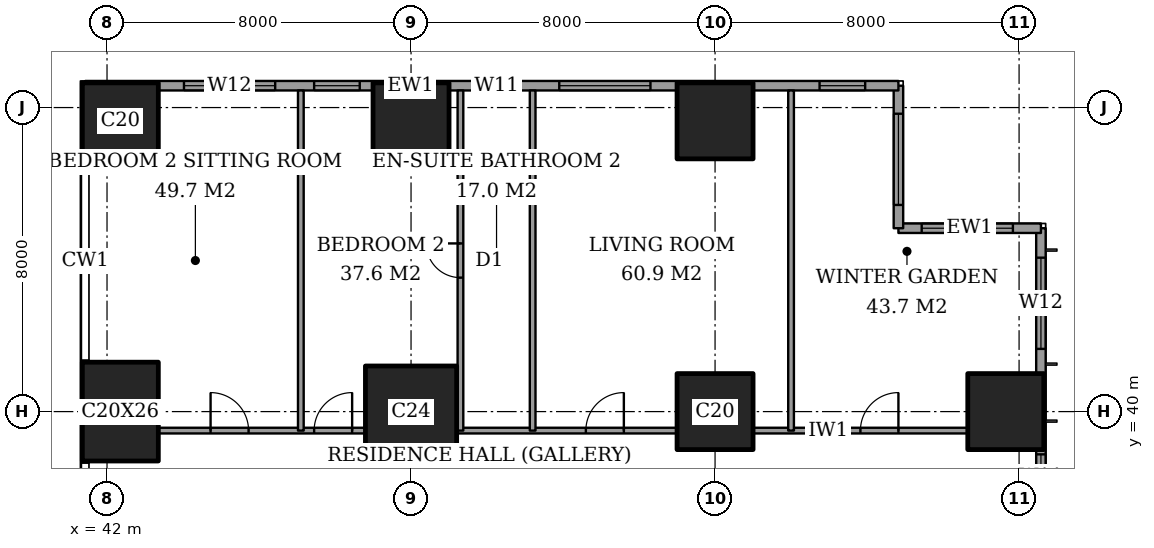
"""IFC4 building model, lengths in metres.
Left out: names, types, materials, properties, quantities, classifications, styles, units other than length and angle.
Written with IfcOpenShell. Run it as: python <this file> out.ifc"""

import sys

from ifc_helpers import new_model, si_unit, direction, frame, frame_2d, origin, origin_2d, place, context, subcontext, project, spatial, rectangle, extrude, element, fill, save


model = new_model("IFC4")
c1 = context("Model", 3, precision=1e-05, world=origin(), true_north=direction((0.0, 1.0)))
c2 = subcontext(c1, "Body", "Model", "MODEL_VIEW")
j1 = project(units=[si_unit("LENGTHUNIT", "METRE"), si_unit("PLANEANGLEUNIT", "RADIAN")], contexts=[c1])
p1 = place(None, origin())
s1 = spatial("IfcSite", under=j1, at=p1, CompositionType="ELEMENT")
p2 = place(p1, origin())
s2 = spatial("IfcBuilding", under=s1, at=p2, CompositionType="ELEMENT")
p3 = place(p2, frame((0.0, 0.0, 117.8)))
s3 = spatial("IfcBuildingStorey", under=s2, at=p3, CompositionType="ELEMENT", Elevation=117.8)
p4 = place(p3, frame((42.35, 40.0, 0.0), z_axis=(0.0, 0.0, 1.0), x_axis=(1.0, 0.0, 0.0)))
e1 = element("IfcColumn", 1, at=p4, inside=s3, PredefinedType="COLUMN", context=c2, shape_type="SweptSolid", body=[
    extrude(rectangle(XDim=2.0, YDim=2.6, at=origin_2d()), origin(), (0.0, 0.0, 1.0), 3.6),
])
p5 = place(p3, frame((42.35, 47.65, 0.0), z_axis=(0.0, 0.0, 1.0), x_axis=(1.0, 0.0, 0.0)))
e2 = element("IfcColumn", 2, at=p5, inside=s3, PredefinedType="COLUMN", context=c2, shape_type="SweptSolid", body=[
    extrude(rectangle(XDim=2.0, YDim=2.0, at=origin_2d()), origin(), (0.0, 0.0, 1.0), 3.6),
])
p6 = place(p3, frame((50.0, 40.0, 0.0), z_axis=(0.0, 0.0, 1.0), x_axis=(1.0, 0.0, 0.0)))
e3 = element("IfcColumn", 3, at=p6, inside=s3, PredefinedType="COLUMN", context=c2, shape_type="SweptSolid", body=[
    extrude(rectangle(XDim=2.4, YDim=2.4, at=origin_2d()), origin(), (0.0, 0.0, 1.0), 3.6),
])
for number, where, z_axis, x_axis in (
    (4, (50.0, 47.65, 0.0), (0.0, 0.0, 1.0), (1.0, 0.0, 0.0)),
    (5, (58.0, 40.0, 0.0), (0.0, 0.0, 1.0), (1.0, 0.0, 0.0)),
    (6, (58.0, 47.65, 0.0), (0.0, 0.0, 1.0), (1.0, 0.0, 0.0)),
    (7, (65.65, 40.0, 0.0), (0.0, 0.0, 1.0), (1.0, 0.0, 0.0)),
):
    element("IfcColumn", number, at=place(p3, frame(where, z_axis=z_axis, x_axis=x_axis)), inside=s3, PredefinedType="COLUMN", context=c2, shape_type="SweptSolid", body=[
        extrude(rectangle(XDim=2.0, YDim=2.0, at=origin_2d()), origin(), (0.0, 0.0, 1.0), 3.6),
    ])
p7 = place(p3, frame((66.575, 3.175, 0.0), z_axis=(0.0, 0.0, 1.0), x_axis=(0.0, 1.0, 0.0)))
e8 = element("IfcWall", 8, at=p7, inside=s3, PredefinedType="SOLIDWALL", context=c2, shape_type="SweptSolid", body=[
    extrude(rectangle(XDim=41.65, YDim=0.25, at=frame_2d((20.825, 0.0))), origin(), (0.0, 0.0, 1.0), 3.6),
])
p8 = place(p7, frame((0.775, 0.0, 0.4)))
e9 = element("IfcOpeningElement", 9, at=p8, cuts=e8, PredefinedType="OPENING", context=c2, shape_type="SweptSolid", body=[
    extrude(rectangle(XDim=2.4, YDim=2.2, at=frame_2d((1.2, 1.1))), frame((0.0, 0.135, 0.0), z_axis=(0.0, -1.0, 0.0), x_axis=(1.0, 0.0, 0.0)), (0.0, 0.0, 1.0), 0.27),
])
p9 = place(p7, frame((6.4, 0.0, 0.4)))
e10 = element("IfcOpeningElement", 10, at=p9, cuts=e8, PredefinedType="OPENING", context=c2, shape_type="SweptSolid", body=[
    extrude(rectangle(XDim=1.2, YDim=2.2, at=frame_2d((0.6, 1.1))), frame((0.0, 0.135, 0.0), z_axis=(0.0, -1.0, 0.0), x_axis=(1.0, 0.0, 0.0)), (0.0, 0.0, 1.0), 0.27),
])
p10 = place(p7, frame((8.475, 0.0, 0.4)))
e11 = element("IfcOpeningElement", 11, at=p10, cuts=e8, PredefinedType="OPENING", context=c2, shape_type="SweptSolid", body=[
    extrude(rectangle(XDim=2.4, YDim=2.2, at=frame_2d((1.2, 1.1))), frame((0.0, 0.135, 0.0), z_axis=(0.0, -1.0, 0.0), x_axis=(1.0, 0.0, 0.0)), (0.0, 0.0, 1.0), 0.27),
])
p11 = place(p7, frame((15.775, 0.0, 0.4)))
e12 = element("IfcOpeningElement", 12, at=p11, cuts=e8, PredefinedType="OPENING", context=c2, shape_type="SweptSolid", body=[
    extrude(rectangle(XDim=2.4, YDim=2.2, at=frame_2d((1.2, 1.1))), frame((0.0, 0.135, 0.0), z_axis=(0.0, -1.0, 0.0), x_axis=(1.0, 0.0, 0.0)), (0.0, 0.0, 1.0), 0.27),
])
p12 = place(p7, frame((23.475, 0.0, 0.4)))
e13 = element("IfcOpeningElement", 13, at=p12, cuts=e8, PredefinedType="OPENING", context=c2, shape_type="SweptSolid", body=[
    extrude(rectangle(XDim=2.4, YDim=2.2, at=frame_2d((1.2, 1.1))), frame((0.0, 0.135, 0.0), z_axis=(0.0, -1.0, 0.0), x_axis=(1.0, 0.0, 0.0)), (0.0, 0.0, 1.0), 0.27),
])
p13 = place(p7, frame((30.975, 0.0, 0.4)))
e14 = element("IfcOpeningElement", 14, at=p13, cuts=e8, PredefinedType="OPENING", context=c2, shape_type="SweptSolid", body=[
    extrude(rectangle(XDim=2.4, YDim=2.2, at=frame_2d((1.2, 1.1))), frame((0.0, 0.135, 0.0), z_axis=(0.0, -1.0, 0.0), x_axis=(1.0, 0.0, 0.0)), (0.0, 0.0, 1.0), 0.27),
])
p14 = place(p7, frame((34.5, 0.0, 0.4)))
e15 = element("IfcOpeningElement", 15, at=p14, cuts=e8, PredefinedType="OPENING", context=c2, shape_type="SweptSolid", body=[
    extrude(rectangle(XDim=1.2, YDim=2.2, at=frame_2d((0.6, 1.1))), frame((0.0, 0.135, 0.0), z_axis=(0.0, -1.0, 0.0), x_axis=(1.0, 0.0, 0.0)), (0.0, 0.0, 1.0), 0.27),
])
p15 = place(p7, frame((38.475, 0.0, 0.4)))
e16 = element("IfcOpeningElement", 16, at=p15, cuts=e8, PredefinedType="OPENING", context=c2, shape_type="SweptSolid", body=[
    extrude(rectangle(XDim=2.4, YDim=2.2, at=frame_2d((1.2, 1.1))), frame((0.0, 0.135, 0.0), z_axis=(0.0, -1.0, 0.0), x_axis=(1.0, 0.0, 0.0)), (0.0, 0.0, 1.0), 0.27),
])
p16 = place(p3, frame((66.575, 44.825, 0.0), z_axis=(0.0, 0.0, 1.0), x_axis=(-1.0, 0.0, 0.0)))
e17 = element("IfcWall", 17, at=p16, inside=s3, PredefinedType="SOLIDWALL", context=c2, shape_type="SweptSolid", body=[
    extrude(rectangle(XDim=3.75, YDim=0.25, at=frame_2d((1.875, 0.0))), origin(), (0.0, 0.0, 1.0), 3.6),
])
p17 = place(p16, frame((0.738, 0.0, 0.4)))
e18 = element("IfcOpeningElement", 18, at=p17, cuts=e17, PredefinedType="OPENING", context=c2, shape_type="SweptSolid", body=[
    extrude(rectangle(XDim=2.4, YDim=2.2, at=frame_2d((1.2, 1.1))), frame((0.0, 0.135, 0.0), z_axis=(0.0, -1.0, 0.0), x_axis=(1.0, 0.0, 0.0)), (0.0, 0.0, 1.0), 0.27),
])
p18 = place(p3, frame((62.825, 44.825, 0.0), z_axis=(0.0, 0.0, 1.0), x_axis=(0.0, 1.0, 0.0)))
e19 = element("IfcWall", 19, at=p18, inside=s3, PredefinedType="SOLIDWALL", context=c2, shape_type="SweptSolid", body=[
    extrude(rectangle(XDim=3.75, YDim=0.25, at=frame_2d((1.875, 0.0))), origin(), (0.0, 0.0, 1.0), 3.6),
])
p19 = place(p18, frame((0.613, 0.0, 0.4)))
e20 = element("IfcOpeningElement", 20, at=p19, cuts=e19, PredefinedType="OPENING", context=c2, shape_type="SweptSolid", body=[
    extrude(rectangle(XDim=2.4, YDim=2.2, at=frame_2d((1.2, 1.1))), frame((0.0, 0.135, 0.0), z_axis=(0.0, -1.0, 0.0), x_axis=(1.0, 0.0, 0.0)), (0.0, 0.0, 1.0), 0.27),
])
p20 = place(p3, frame((62.825, 48.575, 0.0), z_axis=(0.0, 0.0, 1.0), x_axis=(-1.0, 0.0, 0.0)))
e21 = element("IfcWall", 21, at=p20, inside=s3, PredefinedType="SOLIDWALL", context=c2, shape_type="SweptSolid", body=[
    extrude(rectangle(XDim=21.4, YDim=0.25, at=frame_2d((10.7, 0.0))), origin(), (0.0, 0.0, 1.0), 3.6),
])
p21 = place(p20, frame((0.875, 0.0, 0.4)))
e22 = element("IfcOpeningElement", 22, at=p21, cuts=e21, PredefinedType="OPENING", context=c2, shape_type="SweptSolid", body=[
    extrude(rectangle(XDim=1.2, YDim=2.2, at=frame_2d((0.6, 1.1))), frame((0.0, 0.135, 0.0), z_axis=(0.0, -1.0, 0.0), x_axis=(1.0, 0.0, 0.0)), (0.0, 0.0, 1.0), 0.27),
])
p22 = place(p20, frame((6.525, 0.0, 0.4)))
e23 = element("IfcOpeningElement", 23, at=p22, cuts=e21, PredefinedType="OPENING", context=c2, shape_type="SweptSolid", body=[
    extrude(rectangle(XDim=2.4, YDim=2.2, at=frame_2d((1.2, 1.1))), frame((0.0, 0.135, 0.0), z_axis=(0.0, -1.0, 0.0), x_axis=(1.0, 0.0, 0.0)), (0.0, 0.0, 1.0), 0.27),
])
p23 = place(p20, frame((9.975, 0.0, 0.4)))
e24 = element("IfcOpeningElement", 24, at=p23, cuts=e21, PredefinedType="OPENING", context=c2, shape_type="SweptSolid", body=[
    extrude(rectangle(XDim=1.2, YDim=2.2, at=frame_2d((0.6, 1.1))), frame((0.0, 0.135, 0.0), z_axis=(0.0, -1.0, 0.0), x_axis=(1.0, 0.0, 0.0)), (0.0, 0.0, 1.0), 0.27),
])
p24 = place(p20, frame((14.175, 0.0, 0.4)))
e25 = element("IfcOpeningElement", 25, at=p24, cuts=e21, PredefinedType="OPENING", context=c2, shape_type="SweptSolid", body=[
    extrude(rectangle(XDim=1.2, YDim=2.2, at=frame_2d((0.6, 1.1))), frame((0.0, 0.135, 0.0), z_axis=(0.0, -1.0, 0.0), x_axis=(1.0, 0.0, 0.0)), (0.0, 0.0, 1.0), 0.27),
])
p25 = place(p20, frame((16.4, 0.0, 0.4)))
e26 = element("IfcOpeningElement", 26, at=p25, cuts=e21, PredefinedType="OPENING", context=c2, shape_type="SweptSolid", body=[
    extrude(rectangle(XDim=2.4, YDim=2.2, at=frame_2d((1.2, 1.1))), frame((0.0, 0.135, 0.0), z_axis=(0.0, -1.0, 0.0), x_axis=(1.0, 0.0, 0.0)), (0.0, 0.0, 1.0), 0.27),
])
p26 = place(p3, frame((43.35, 39.5, 0.0), z_axis=(0.0, 0.0, 1.0), x_axis=(1.0, 0.0, 0.0)))
e27 = element("IfcWall", 27, at=p26, inside=s3, PredefinedType="PARTITIONING", context=c2, shape_type="SweptSolid", body=[
    extrude(rectangle(XDim=5.45, YDim=0.15, at=frame_2d((2.725, 0.0))), origin(), (0.0, 0.0, 1.0), 3.35),
])
p27 = place(p26, frame((4.1, 0.0, 0.0)))
e28 = element("IfcOpeningElement", 28, at=p27, cuts=e27, PredefinedType="OPENING", context=c2, shape_type="SweptSolid", body=[
    extrude(rectangle(XDim=1.0, YDim=2.1, at=frame_2d((0.5, 1.05))), frame((0.0, 0.085, 0.0), z_axis=(0.0, -1.0, 0.0), x_axis=(1.0, 0.0, 0.0)), (0.0, 0.0, 1.0), 0.17),
])
p28 = place(p26, frame((1.375, 0.0, 0.0)))
e29 = element("IfcOpeningElement", 29, at=p28, cuts=e27, PredefinedType="OPENING", context=c2, shape_type="SweptSolid", body=[
    extrude(rectangle(XDim=1.0, YDim=2.1, at=frame_2d((0.5, 1.05))), frame((0.0, 0.085, 0.0), z_axis=(0.0, -1.0, 0.0), x_axis=(1.0, 0.0, 0.0)), (0.0, 0.0, 1.0), 0.17),
])
p29 = place(p3, frame((51.2, 39.5, 0.0), z_axis=(0.0, 0.0, 1.0), x_axis=(1.0, 0.0, 0.0)))
e30 = element("IfcWall", 30, at=p29, inside=s3, PredefinedType="PARTITIONING", context=c2, shape_type="SweptSolid", body=[
    extrude(rectangle(XDim=5.8, YDim=0.15, at=frame_2d((2.9, 0.0))), origin(), (0.0, 0.0, 1.0), 3.35),
])
p30 = place(p29, frame((3.4, 0.0, 0.0)))
e31 = element("IfcOpeningElement", 31, at=p30, cuts=e30, PredefinedType="OPENING", context=c2, shape_type="SweptSolid", body=[
    extrude(rectangle(XDim=1.0, YDim=2.1, at=frame_2d((0.5, 1.05))), frame((0.0, 0.085, 0.0), z_axis=(0.0, -1.0, 0.0), x_axis=(1.0, 0.0, 0.0)), (0.0, 0.0, 1.0), 0.17),
])
p31 = place(p3, frame((59.0, 39.5, 0.0), z_axis=(0.0, 0.0, 1.0), x_axis=(1.0, 0.0, 0.0)))
e32 = element("IfcWall", 32, at=p31, inside=s3, PredefinedType="PARTITIONING", context=c2, shape_type="SweptSolid", body=[
    extrude(rectangle(XDim=5.65, YDim=0.15, at=frame_2d((2.825, 0.0))), origin(), (0.0, 0.0, 1.0), 3.35),
])
p32 = place(p31, frame((2.825, 0.0, 0.0)))
e33 = element("IfcOpeningElement", 33, at=p32, cuts=e32, PredefinedType="OPENING", context=c2, shape_type="SweptSolid", body=[
    extrude(rectangle(XDim=1.0, YDim=2.1, at=frame_2d((0.5, 1.05))), frame((0.0, 0.085, 0.0), z_axis=(0.0, -1.0, 0.0), x_axis=(1.0, 0.0, 0.0)), (0.0, 0.0, 1.0), 0.17),
])
p33 = place(p3, frame((47.1, 39.5, 0.0), z_axis=(0.0, 0.0, 1.0), x_axis=(0.0, 1.0, 0.0)))
e34 = element("IfcWall", 34, at=p33, inside=s3, PredefinedType="PARTITIONING", context=c2, shape_type="SweptSolid", body=[
    extrude(rectangle(XDim=8.95, YDim=0.15, at=frame_2d((4.475, 0.0))), origin(), (0.0, 0.0, 1.0), 3.35),
])
p34 = place(p3, frame((51.3, 39.5, 0.0), z_axis=(0.0, 0.0, 1.0), x_axis=(0.0, 1.0, 0.0)))
e35 = element("IfcWall", 35, at=p34, inside=s3, PredefinedType="PARTITIONING", context=c2, shape_type="SweptSolid", body=[
    extrude(rectangle(XDim=8.95, YDim=0.15, at=frame_2d((4.475, 0.0))), origin(), (0.0, 0.0, 1.0), 3.35),
])
p35 = place(p34, frame((4.025, 0.0, 0.0)))
e36 = element("IfcOpeningElement", 36, at=p35, cuts=e35, PredefinedType="OPENING", context=c2, shape_type="SweptSolid", body=[
    extrude(rectangle(XDim=0.9, YDim=2.1, at=frame_2d((0.45, 1.05))), frame((0.0, 0.085, 0.0), z_axis=(0.0, -1.0, 0.0), x_axis=(1.0, 0.0, 0.0)), (0.0, 0.0, 1.0), 0.17),
])
for number, where, z_axis, x_axis in (
    (37, (53.2, 39.5, 0.0), (0.0, 0.0, 1.0), (0.0, 1.0, 0.0)),
    (38, (60.0, 39.5, 0.0), (0.0, 0.0, 1.0), (0.0, 1.0, 0.0)),
):
    element("IfcWall", number, at=place(p3, frame(where, z_axis=z_axis, x_axis=x_axis)), inside=s3, PredefinedType="PARTITIONING", context=c2, shape_type="SweptSolid", body=[
        extrude(rectangle(XDim=8.95, YDim=0.15, at=frame_2d((4.475, 0.0))), origin(), (0.0, 0.0, 1.0), 3.35),
    ])
p36 = place(p14, origin())
e39 = element("IfcWindow", 39, at=p36, inside=s3, PartitioningType="SINGLE_PANEL", PredefinedType="WINDOW", context=c2, shape_type="SweptSolid", body=[
    extrude(rectangle(XDim=1.2, YDim=2.2, at=frame_2d((0.6, 1.1))), frame((0.0, 0.03, 0.0), z_axis=(0.0, -1.0, 0.0), x_axis=(1.0, 0.0, 0.0)), (0.0, 0.0, 1.0), 0.06),
])
fill(e15, e39)
p37 = place(p15, origin())
e40 = element("IfcWindow", 40, at=p37, inside=s3, PartitioningType="SINGLE_PANEL", PredefinedType="WINDOW", context=c2, shape_type="SweptSolid", body=[
    extrude(rectangle(XDim=2.4, YDim=2.2, at=frame_2d((1.2, 1.1))), frame((0.0, 0.03, 0.0), z_axis=(0.0, -1.0, 0.0), x_axis=(1.0, 0.0, 0.0)), (0.0, 0.0, 1.0), 0.06),
])
fill(e16, e40)
p38 = place(p17, origin())
e41 = element("IfcWindow", 41, at=p38, inside=s3, PartitioningType="SINGLE_PANEL", PredefinedType="WINDOW", context=c2, shape_type="SweptSolid", body=[
    extrude(rectangle(XDim=2.4, YDim=2.2, at=frame_2d((1.2, 1.1))), frame((0.0, 0.03, 0.0), z_axis=(0.0, -1.0, 0.0), x_axis=(1.0, 0.0, 0.0)), (0.0, 0.0, 1.0), 0.06),
])
fill(e18, e41)
p39 = place(p19, origin())
e42 = element("IfcWindow", 42, at=p39, inside=s3, PartitioningType="SINGLE_PANEL", PredefinedType="WINDOW", context=c2, shape_type="SweptSolid", body=[
    extrude(rectangle(XDim=2.4, YDim=2.2, at=frame_2d((1.2, 1.1))), frame((0.0, 0.03, 0.0), z_axis=(0.0, -1.0, 0.0), x_axis=(1.0, 0.0, 0.0)), (0.0, 0.0, 1.0), 0.06),
])
fill(e20, e42)
p40 = place(p21, origin())
e43 = element("IfcWindow", 43, at=p40, inside=s3, PartitioningType="SINGLE_PANEL", PredefinedType="WINDOW", context=c2, shape_type="SweptSolid", body=[
    extrude(rectangle(XDim=1.2, YDim=2.2, at=frame_2d((0.6, 1.1))), frame((0.0, 0.03, 0.0), z_axis=(0.0, -1.0, 0.0), x_axis=(1.0, 0.0, 0.0)), (0.0, 0.0, 1.0), 0.06),
])
fill(e22, e43)
p41 = place(p22, origin())
e44 = element("IfcWindow", 44, at=p41, inside=s3, PartitioningType="SINGLE_PANEL", PredefinedType="WINDOW", context=c2, shape_type="SweptSolid", body=[
    extrude(rectangle(XDim=2.4, YDim=2.2, at=frame_2d((1.2, 1.1))), frame((0.0, 0.03, 0.0), z_axis=(0.0, -1.0, 0.0), x_axis=(1.0, 0.0, 0.0)), (0.0, 0.0, 1.0), 0.06),
])
fill(e23, e44)
p42 = place(p23, origin())
e45 = element("IfcWindow", 45, at=p42, inside=s3, PartitioningType="SINGLE_PANEL", PredefinedType="WINDOW", context=c2, shape_type="SweptSolid", body=[
    extrude(rectangle(XDim=1.2, YDim=2.2, at=frame_2d((0.6, 1.1))), frame((0.0, 0.03, 0.0), z_axis=(0.0, -1.0, 0.0), x_axis=(1.0, 0.0, 0.0)), (0.0, 0.0, 1.0), 0.06),
])
fill(e24, e45)
p43 = place(p24, origin())
e46 = element("IfcWindow", 46, at=p43, inside=s3, PartitioningType="SINGLE_PANEL", PredefinedType="WINDOW", context=c2, shape_type="SweptSolid", body=[
    extrude(rectangle(XDim=1.2, YDim=2.2, at=frame_2d((0.6, 1.1))), frame((0.0, 0.03, 0.0), z_axis=(0.0, -1.0, 0.0), x_axis=(1.0, 0.0, 0.0)), (0.0, 0.0, 1.0), 0.06),
])
fill(e25, e46)
p44 = place(p25, origin())
e47 = element("IfcWindow", 47, at=p44, inside=s3, PartitioningType="SINGLE_PANEL", PredefinedType="WINDOW", context=c2, shape_type="SweptSolid", body=[
    extrude(rectangle(XDim=2.4, YDim=2.2, at=frame_2d((1.2, 1.1))), frame((0.0, 0.03, 0.0), z_axis=(0.0, -1.0, 0.0), x_axis=(1.0, 0.0, 0.0)), (0.0, 0.0, 1.0), 0.06),
])
fill(e26, e47)
p45 = place(p32, origin())
e48 = element("IfcDoor", 48, at=p45, inside=s3, OperationType="SINGLE_SWING_LEFT", PredefinedType="DOOR", context=c2, shape_type="SweptSolid", body=[
    extrude(rectangle(XDim=1.0, YDim=2.1, at=frame_2d((0.5, 1.05))), frame((0.0, 0.025, 0.0), z_axis=(0.0, -1.0, 0.0), x_axis=(1.0, 0.0, 0.0)), (0.0, 0.0, 1.0), 0.05),
])
fill(e33, e48)
p46 = place(p30, origin())
e49 = element("IfcDoor", 49, at=p46, inside=s3, OperationType="SINGLE_SWING_LEFT", PredefinedType="DOOR", context=c2, shape_type="SweptSolid", body=[
    extrude(rectangle(XDim=1.0, YDim=2.1, at=frame_2d((0.5, 1.05))), frame((0.0, 0.025, 0.0), z_axis=(0.0, -1.0, 0.0), x_axis=(1.0, 0.0, 0.0)), (0.0, 0.0, 1.0), 0.05),
])
fill(e31, e49)
p47 = place(p35, origin())
e50 = element("IfcDoor", 50, at=p47, inside=s3, OperationType="SINGLE_SWING_LEFT", PredefinedType="DOOR", context=c2, shape_type="SweptSolid", body=[
    extrude(rectangle(XDim=0.9, YDim=2.1, at=frame_2d((0.45, 1.05))), frame((0.0, 0.025, 0.0), z_axis=(0.0, -1.0, 0.0), x_axis=(1.0, 0.0, 0.0)), (0.0, 0.0, 1.0), 0.05),
])
fill(e36, e50)
p48 = place(p27, origin())
e51 = element("IfcDoor", 51, at=p48, inside=s3, OperationType="SINGLE_SWING_LEFT", PredefinedType="DOOR", context=c2, shape_type="SweptSolid", body=[
    extrude(rectangle(XDim=1.0, YDim=2.1, at=frame_2d((0.5, 1.05))), frame((0.0, 0.025, 0.0), z_axis=(0.0, -1.0, 0.0), x_axis=(1.0, 0.0, 0.0)), (0.0, 0.0, 1.0), 0.05),
])
fill(e28, e51)
p49 = place(p28, origin())
e52 = element("IfcDoor", 52, at=p49, inside=s3, OperationType="SINGLE_SWING_RIGHT", PredefinedType="DOOR", context=c2, shape_type="SweptSolid", body=[
    extrude(rectangle(XDim=1.0, YDim=2.1, at=frame_2d((0.5, 1.05))), frame((0.0, 0.025, 0.0), z_axis=(0.0, -1.0, 0.0), x_axis=(1.0, 0.0, 0.0)), (0.0, 0.0, 1.0), 0.05),
])
fill(e29, e52)
save(model, sys.argv[1])
